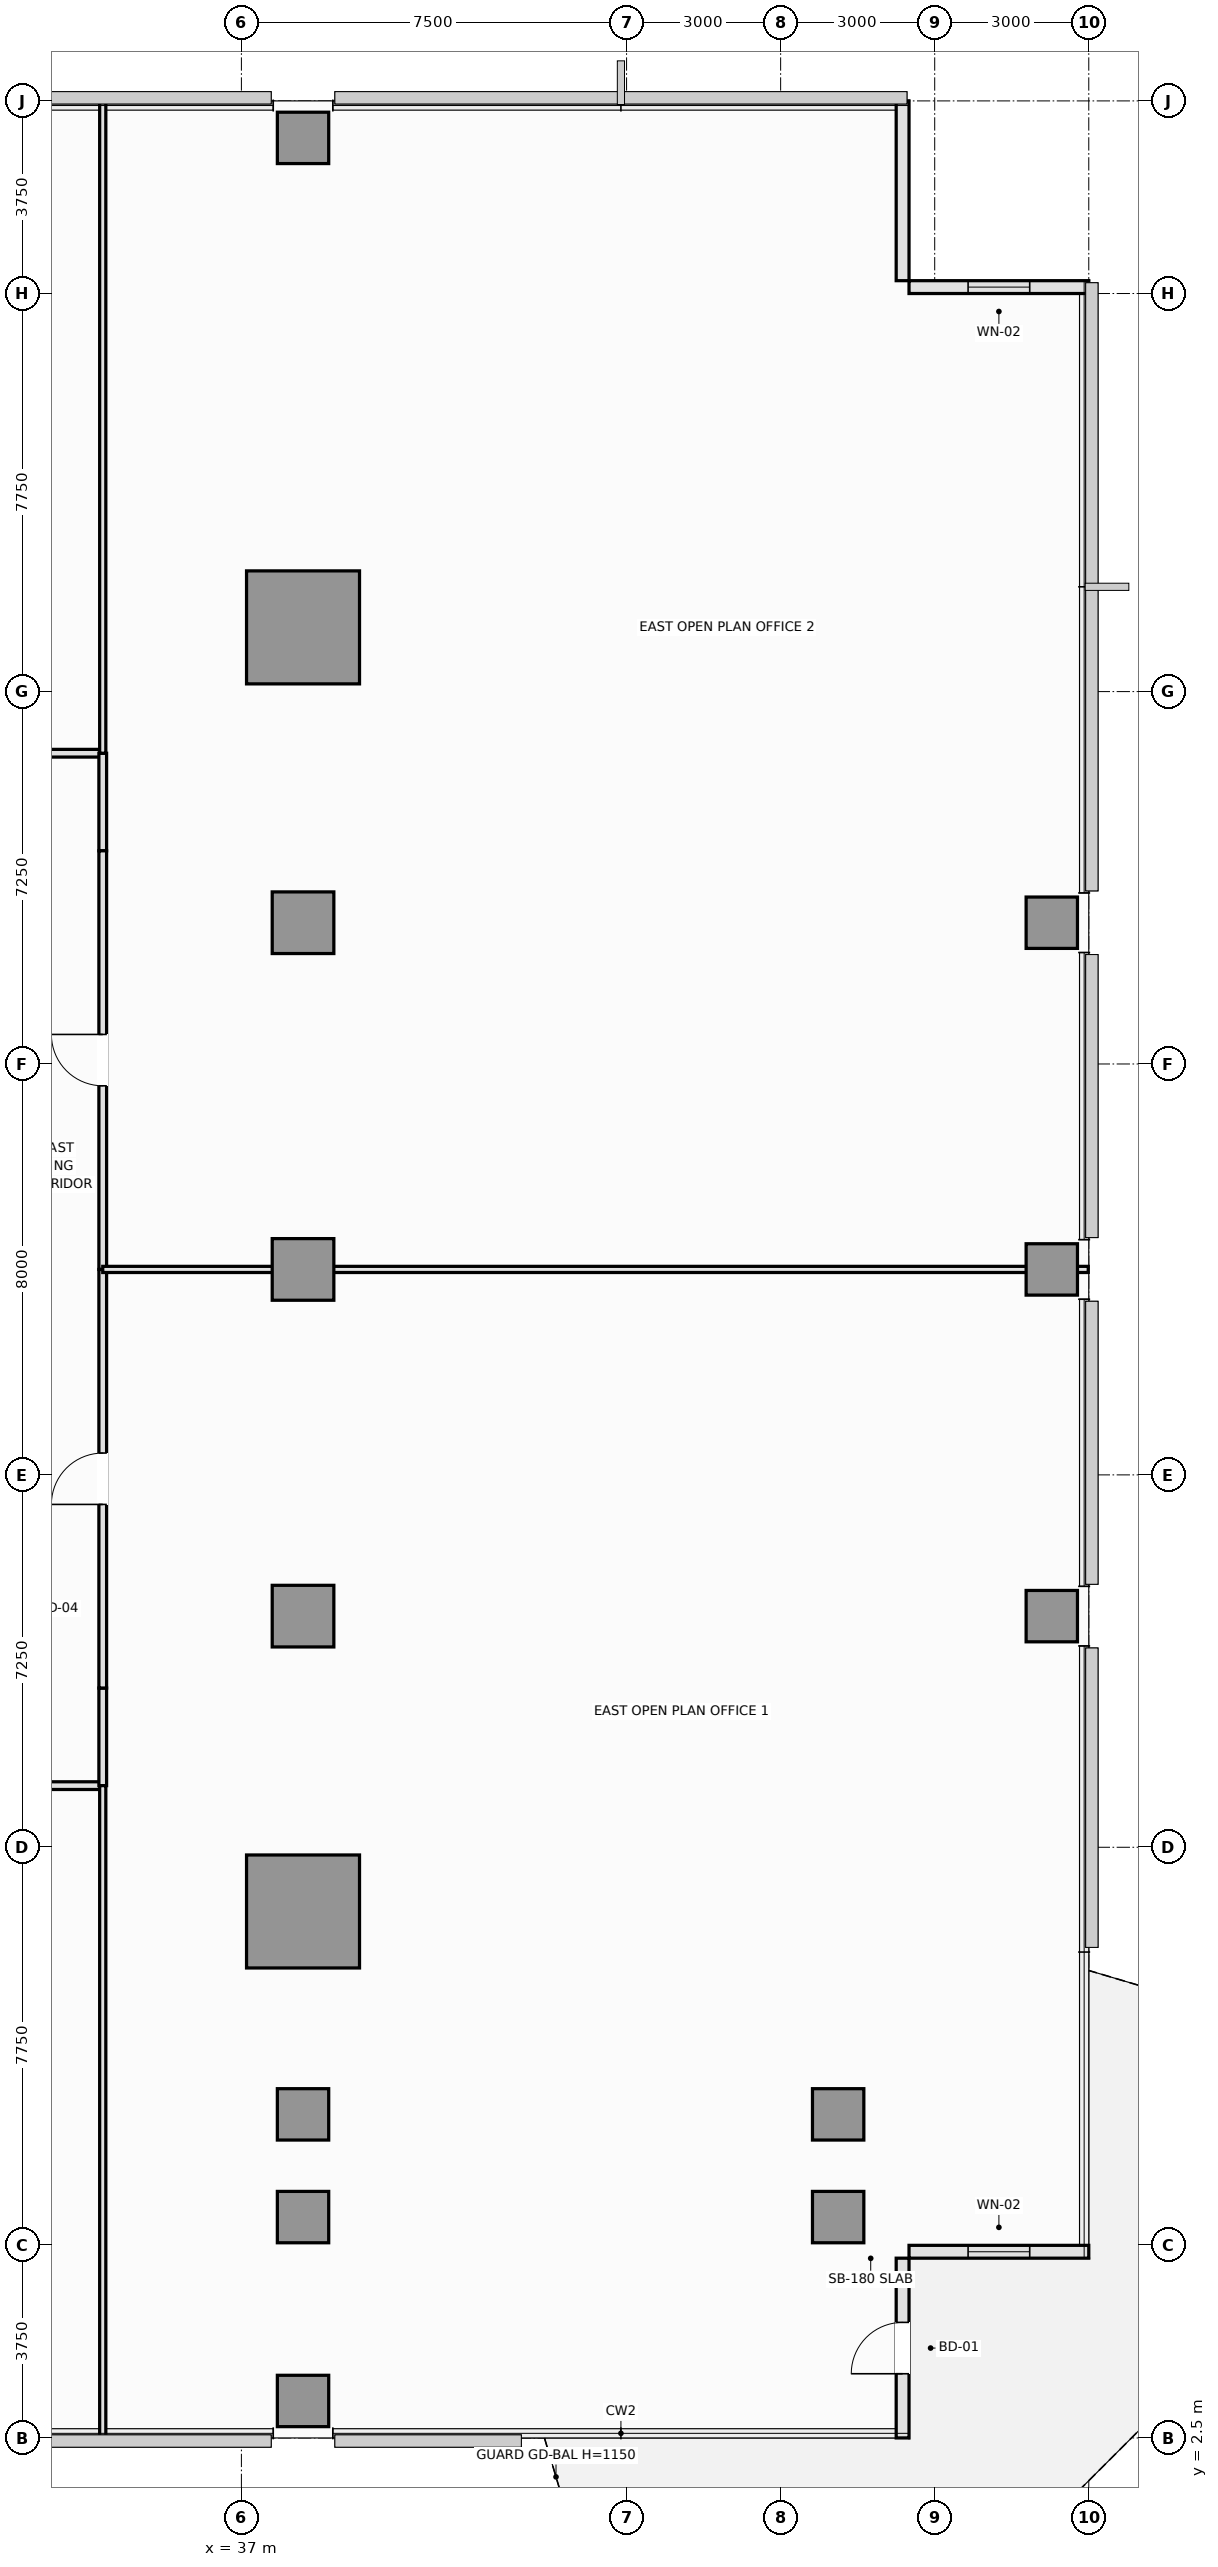
"""IFC4 building model, lengths in metres.
Left out: names, types, materials, properties, quantities, classifications, styles, units other than length and angle.
Written with IfcOpenShell. Run it as: python <this file> out.ifc"""

import sys

from ifc_helpers import new_model, si_unit, direction, frame, frame_2d, origin, origin_2d, place, context, subcontext, project, spatial, rectangle, extrude, element, fill, save


model = new_model("IFC4")
c1 = context("Model", 3, precision=1e-05, world=origin(), true_north=direction((0.0, 1.0)))
c2 = subcontext(c1, "Body", "Model", "MODEL_VIEW")
j1 = project(units=[si_unit("LENGTHUNIT", "METRE"), si_unit("PLANEANGLEUNIT", "RADIAN")], contexts=[c1])
p1 = place(None, origin())
s1 = spatial("IfcSite", under=j1, at=p1, CompositionType="ELEMENT")
p2 = place(p1, origin())
s2 = spatial("IfcBuilding", under=s1, at=p2, CompositionType="ELEMENT")
p3 = place(p2, frame((0.0, 0.0, 39.8)))
s3 = spatial("IfcBuildingStorey", under=s2, at=p3, CompositionType="ELEMENT", Elevation=39.8)
for number, where, z_axis, x_axis in (
    (1, (38.2, 12.75, 0.0), (0.0, 0.0, 1.0), (1.0, 0.0, 0.0)),
    (2, (38.2, 37.75, 0.0), (0.0, 0.0, 1.0), (1.0, 0.0, 0.0)),
):
    element("IfcColumn", number, at=place(p3, frame(where, z_axis=z_axis, x_axis=x_axis)), inside=s3, PredefinedType="COLUMN", context=c2, shape_type="SweptSolid", body=[
        extrude(rectangle(XDim=2.2, YDim=2.2, at=origin_2d()), origin(), (0.0, 0.0, 1.0), 3.55),
    ])
for number, where, z_axis, x_axis in (
    (3, (38.2, 18.5, 0.0), (0.0, 0.0, 1.0), (1.0, 0.0, 0.0)),
    (4, (38.2, 25.25, 0.0), (0.0, 0.0, 1.0), (1.0, 0.0, 0.0)),
    (5, (38.2, 32.0, 0.0), (0.0, 0.0, 1.0), (1.0, 0.0, 0.0)),
):
    element("IfcColumn", number, at=place(p3, frame(where, z_axis=z_axis, x_axis=x_axis)), inside=s3, PredefinedType="COLUMN", context=c2, shape_type="SweptSolid", body=[
        extrude(rectangle(XDim=1.2, YDim=1.2, at=origin_2d()), origin(), (0.0, 0.0, 1.0), 3.55),
    ])
for number, where, z_axis, x_axis in (
    (6, (48.62, 6.8, 0.0), (0.0, 0.0, 1.0), (1.0, 0.0, 0.0)),
    (7, (38.2, 6.8, 0.0), (0.0, 0.0, 1.0), (1.0, 0.0, 0.0)),
    (8, (38.2, 8.8, 0.0), (0.0, 0.0, 1.0), (1.0, 0.0, 0.0)),
    (9, (48.62, 8.8, 0.0), (0.0, 0.0, 1.0), (1.0, 0.0, 0.0)),
    (10, (52.78, 18.5, 0.0), (0.0, 0.0, 1.0), (1.0, 0.0, 0.0)),
    (11, (52.78, 25.25, 0.0), (0.0, 0.0, 1.0), (1.0, 0.0, 0.0)),
    (12, (52.78, 32.0, 0.0), (0.0, 0.0, 1.0), (1.0, 0.0, 0.0)),
    (13, (38.2, 3.22, 0.0), (0.0, 0.0, 1.0), (1.0, 0.0, 0.0)),
    (14, (38.2, 47.28, 0.0), (0.0, 0.0, 1.0), (1.0, 0.0, 0.0)),
):
    element("IfcColumn", number, at=place(p3, frame(where, z_axis=z_axis, x_axis=x_axis)), inside=s3, PredefinedType="COLUMN", context=c2, shape_type="SweptSolid", body=[
        extrude(rectangle(XDim=1.0, YDim=1.0, at=origin_2d()), origin(), (0.0, 0.0, 1.0), 3.55),
    ])
p4 = place(p3, frame((49.875, 2.5, 0.0), z_axis=(0.0, 0.0, 1.0), x_axis=(0.0, 1.0, 0.0)))
e15 = element("IfcWall", 15, at=p4, inside=s3, PredefinedType="SOLIDWALL", context=c2, shape_type="SweptSolid", body=[
    extrude(rectangle(XDim=3.5, YDim=0.25, at=frame_2d((1.75, 0.0))), origin(), (0.0, 0.0, 1.0), 3.07),
])
p5 = place(p4, frame((1.25, 0.0, 0.0)))
e16 = element("IfcOpeningElement", 16, at=p5, cuts=e15, PredefinedType="OPENING", context=c2, shape_type="SweptSolid", body=[
    extrude(rectangle(XDim=1.0, YDim=2.2, at=frame_2d((0.5, 1.1))), frame((0.0, 0.135, 0.0), z_axis=(0.0, -1.0, 0.0), x_axis=(1.0, 0.0, 0.0)), (0.0, 0.0, 1.0), 0.27),
])
p6 = place(p3, frame((50.0, 6.125, 0.0), z_axis=(0.0, 0.0, 1.0), x_axis=(1.0, 0.0, 0.0)))
e17 = element("IfcWall", 17, at=p6, inside=s3, PredefinedType="SOLIDWALL", context=c2, shape_type="SweptSolid", body=[
    extrude(rectangle(XDim=3.5, YDim=0.25, at=frame_2d((1.75, 0.0))), origin(), (0.0, 0.0, 1.0), 3.07),
])
p7 = place(p6, frame((1.15, 0.0, 0.9)))
e18 = element("IfcOpeningElement", 18, at=p7, cuts=e17, PredefinedType="OPENING", context=c2, shape_type="SweptSolid", body=[
    extrude(rectangle(XDim=1.2, YDim=1.8, at=frame_2d((0.6, 0.9))), frame((0.0, 0.135, 0.0), z_axis=(0.0, -1.0, 0.0), x_axis=(1.0, 0.0, 0.0)), (0.0, 0.0, 1.0), 0.27),
])
p8 = place(p3, frame((53.5, 44.375, 0.0), z_axis=(0.0, 0.0, 1.0), x_axis=(-1.0, 0.0, 0.0)))
e19 = element("IfcWall", 19, at=p8, inside=s3, PredefinedType="SOLIDWALL", context=c2, shape_type="SweptSolid", body=[
    extrude(rectangle(XDim=3.5, YDim=0.25, at=frame_2d((1.75, 0.0))), origin(), (0.0, 0.0, 1.0), 3.37),
])
p9 = place(p8, frame((1.15, 0.0, 0.9)))
e20 = element("IfcOpeningElement", 20, at=p9, cuts=e19, PredefinedType="OPENING", context=c2, shape_type="SweptSolid", body=[
    extrude(rectangle(XDim=1.2, YDim=1.8, at=frame_2d((0.6, 0.9))), frame((0.0, 0.135, 0.0), z_axis=(0.0, -1.0, 0.0), x_axis=(1.0, 0.0, 0.0)), (0.0, 0.0, 1.0), 0.27),
])
p10 = place(p3, frame((49.875, 44.5, 0.0), z_axis=(0.0, 0.0, 1.0), x_axis=(0.0, 1.0, 0.0)))
e21 = element("IfcWall", 21, at=p10, inside=s3, PredefinedType="SOLIDWALL", context=c2, shape_type="SweptSolid", body=[
    extrude(rectangle(XDim=3.5, YDim=0.25, at=frame_2d((1.75, 0.0))), origin(), (0.0, 0.0, 1.0), 3.37),
])
p11 = place(p3, frame((27.5, 15.2, 0.0), z_axis=(0.0, 0.0, 1.0), x_axis=(1.0, 0.0, 0.0)))
e22 = element("IfcWall", 22, at=p11, inside=s3, PredefinedType="PARTITIONING", context=c2, shape_type="SweptSolid", body=[
    extrude(rectangle(XDim=6.8, YDim=0.15, at=frame_2d((3.4, 0.0))), origin(), (0.0, 0.0, 1.0), 3.37),
])
p12 = place(p11, frame((2.9, 0.0, 0.0)))
e23 = element("IfcOpeningElement", 23, at=p12, cuts=e22, PredefinedType="OPENING", context=c2, shape_type="SweptSolid", body=[
    extrude(rectangle(XDim=1.0, YDim=2.15, at=frame_2d((0.5, 1.075))), frame((0.0, 0.085, 0.0), z_axis=(0.0, -1.0, 0.0), x_axis=(1.0, 0.0, 0.0)), (0.0, 0.0, 1.0), 0.17),
])
p13 = place(p3, frame((34.3, 15.2, 0.0), z_axis=(0.0, 0.0, 1.0), x_axis=(0.0, 1.0, 0.0)))
e24 = element("IfcWall", 24, at=p13, inside=s3, PredefinedType="PARTITIONING", context=c2, shape_type="SweptSolid", body=[
    extrude(rectangle(XDim=1.9, YDim=0.15, at=frame_2d((0.95, 0.0))), origin(), (0.0, 0.0, 1.0), 3.37),
])
p14 = place(p3, frame((27.5, 35.3, 0.0), z_axis=(0.0, 0.0, 1.0), x_axis=(1.0, 0.0, 0.0)))
e25 = element("IfcWall", 25, at=p14, inside=s3, PredefinedType="PARTITIONING", context=c2, shape_type="SweptSolid", body=[
    extrude(rectangle(XDim=6.8, YDim=0.15, at=frame_2d((3.4, 0.0))), origin(), (0.0, 0.0, 1.0), 3.37),
])
p15 = place(p14, frame((2.9, 0.0, 0.0)))
e26 = element("IfcOpeningElement", 26, at=p15, cuts=e25, PredefinedType="OPENING", context=c2, shape_type="SweptSolid", body=[
    extrude(rectangle(XDim=1.0, YDim=2.15, at=frame_2d((0.5, 1.075))), frame((0.0, 0.085, 0.0), z_axis=(0.0, -1.0, 0.0), x_axis=(1.0, 0.0, 0.0)), (0.0, 0.0, 1.0), 0.17),
])
p16 = place(p3, frame((34.3, 33.4, 0.0), z_axis=(0.0, 0.0, 1.0), x_axis=(0.0, 1.0, 0.0)))
e27 = element("IfcWall", 27, at=p16, inside=s3, PredefinedType="PARTITIONING", context=c2, shape_type="SweptSolid", body=[
    extrude(rectangle(XDim=1.9, YDim=0.15, at=frame_2d((0.95, 0.0))), origin(), (0.0, 0.0, 1.0), 3.37),
])
p17 = place(p3, frame((34.3, 17.1, 0.0), z_axis=(0.0, 0.0, 1.0), x_axis=(0.0, 1.0, 0.0)))
e28 = element("IfcWall", 28, at=p17, inside=s3, PredefinedType="PARTITIONING", context=c2, shape_type="SweptSolid", body=[
    extrude(rectangle(XDim=8.15, YDim=0.15, at=frame_2d((4.075, 0.0))), origin(), (0.0, 0.0, 1.0), 3.37),
])
p18 = place(p17, frame((3.575, 0.0, 0.0)))
e29 = element("IfcOpeningElement", 29, at=p18, cuts=e28, PredefinedType="OPENING", context=c2, shape_type="SweptSolid", body=[
    extrude(rectangle(XDim=1.0, YDim=2.15, at=frame_2d((0.5, 1.075))), frame((0.0, 0.085, 0.0), z_axis=(0.0, -1.0, 0.0), x_axis=(1.0, 0.0, 0.0)), (0.0, 0.0, 1.0), 0.17),
])
p19 = place(p3, frame((34.3, 25.25, 0.0), z_axis=(0.0, 0.0, 1.0), x_axis=(0.0, 1.0, 0.0)))
e30 = element("IfcWall", 30, at=p19, inside=s3, PredefinedType="PARTITIONING", context=c2, shape_type="SweptSolid", body=[
    extrude(rectangle(XDim=8.15, YDim=0.15, at=frame_2d((4.075, 0.0))), origin(), (0.0, 0.0, 1.0), 3.37),
])
p20 = place(p19, frame((3.575, 0.0, 0.0)))
e31 = element("IfcOpeningElement", 31, at=p20, cuts=e30, PredefinedType="OPENING", context=c2, shape_type="SweptSolid", body=[
    extrude(rectangle(XDim=1.0, YDim=2.15, at=frame_2d((0.5, 1.075))), frame((0.0, 0.085, 0.0), z_axis=(0.0, -1.0, 0.0), x_axis=(1.0, 0.0, 0.0)), (0.0, 0.0, 1.0), 0.17),
])
for number, where, z_axis, x_axis in (
    (32, (34.3, 2.51, 0.0), (0.0, 0.0, 1.0), (0.0, 1.0, 0.0)),
    (33, (34.3, 35.3, 0.0), (0.0, 0.0, 1.0), (0.0, 1.0, 0.0)),
):
    element("IfcWall", number, at=place(p3, frame(where, z_axis=z_axis, x_axis=x_axis)), inside=s3, PredefinedType="PARTITIONING", context=c2, shape_type="SweptSolid", body=[
        extrude(rectangle(XDim=12.69, YDim=0.12, at=frame_2d((6.345, 0.0))), origin(), (0.0, 0.0, 1.0), 3.37),
    ])
p21 = place(p3, frame((34.3, 25.25, 0.0), z_axis=(0.0, 0.0, 1.0), x_axis=(1.0, 0.0, 0.0)))
e34 = element("IfcWall", 34, at=p21, inside=s3, PredefinedType="PARTITIONING", context=c2, shape_type="SweptSolid", body=[
    extrude(rectangle(XDim=19.19, YDim=0.12, at=frame_2d((9.595, 0.0))), origin(), (0.0, 0.0, 1.0), 2.72),
])
p22 = place(p5, frame((1.0, 0.0, 0.0), z_axis=(0.0, 0.0, 1.0), x_axis=(-1.0, 0.0, 0.0)))
e35 = element("IfcDoor", 35, at=p22, inside=s3, OperationType="SINGLE_SWING_LEFT", PredefinedType="DOOR", context=c2, shape_type="SweptSolid", body=[
    extrude(rectangle(XDim=1.0, YDim=2.2, at=frame_2d((0.5, 1.1))), frame((0.0, 0.025, 0.0), z_axis=(0.0, -1.0, 0.0), x_axis=(1.0, 0.0, 0.0)), (0.0, 0.0, 1.0), 0.05),
])
fill(e16, e35)
p23 = place(p7, origin())
e36 = element("IfcWindow", 36, at=p23, inside=s3, PartitioningType="SINGLE_PANEL", PredefinedType="WINDOW", context=c2, shape_type="SweptSolid", body=[
    extrude(rectangle(XDim=1.2, YDim=1.8, at=frame_2d((0.6, 0.9))), frame((0.0, 0.03, 0.0), z_axis=(0.0, -1.0, 0.0), x_axis=(1.0, 0.0, 0.0)), (0.0, 0.0, 1.0), 0.06),
])
fill(e18, e36)
p24 = place(p9, origin())
e37 = element("IfcWindow", 37, at=p24, inside=s3, PartitioningType="SINGLE_PANEL", PredefinedType="WINDOW", context=c2, shape_type="SweptSolid", body=[
    extrude(rectangle(XDim=1.2, YDim=1.8, at=frame_2d((0.6, 0.9))), frame((0.0, 0.03, 0.0), z_axis=(0.0, -1.0, 0.0), x_axis=(1.0, 0.0, 0.0)), (0.0, 0.0, 1.0), 0.06),
])
fill(e20, e37)
p25 = place(p18, origin())
e38 = element("IfcDoor", 38, at=p25, inside=s3, OperationType="SINGLE_SWING_LEFT", PredefinedType="DOOR", context=c2, shape_type="SweptSolid", body=[
    extrude(rectangle(XDim=1.0, YDim=2.15, at=frame_2d((0.5, 1.075))), frame((0.0, 0.025, 0.0), z_axis=(0.0, -1.0, 0.0), x_axis=(1.0, 0.0, 0.0)), (0.0, 0.0, 1.0), 0.05),
])
fill(e29, e38)
p26 = place(p20, origin())
e39 = element("IfcDoor", 39, at=p26, inside=s3, OperationType="SINGLE_SWING_RIGHT", PredefinedType="DOOR", context=c2, shape_type="SweptSolid", body=[
    extrude(rectangle(XDim=1.0, YDim=2.15, at=frame_2d((0.5, 1.075))), frame((0.0, 0.025, 0.0), z_axis=(0.0, -1.0, 0.0), x_axis=(1.0, 0.0, 0.0)), (0.0, 0.0, 1.0), 0.05),
])
fill(e31, e39)
save(model, sys.argv[1])
